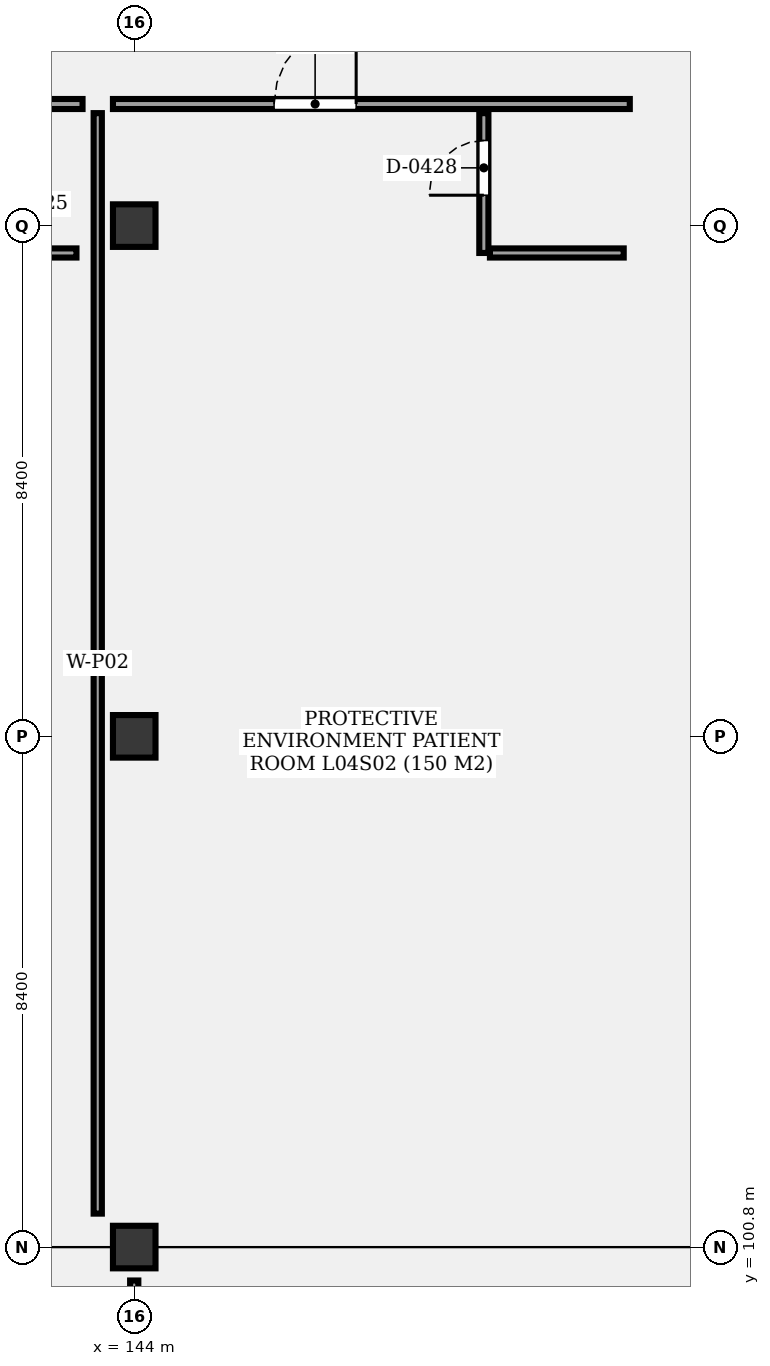
"""IFC4 building model, lengths in metres.
Left out: names, types, materials, properties, quantities, classifications, styles, units other than length and angle.
Written with IfcOpenShell. Run it as: python <this file> out.ifc"""

import sys

from ifc_helpers import new_model, si_unit, direction, frame, frame_2d, origin, origin_2d, place, context, subcontext, project, spatial, rectangle, extrude, element, fill, save


model = new_model("IFC4")
c1 = context("Model", 3, precision=1e-05, world=origin(), true_north=direction((0.0, 1.0)))
c2 = subcontext(c1, "Body", "Model", "MODEL_VIEW")
j1 = project(units=[si_unit("LENGTHUNIT", "METRE"), si_unit("PLANEANGLEUNIT", "RADIAN")], contexts=[c1])
p1 = place(None, origin())
s1 = spatial("IfcSite", under=j1, at=p1, CompositionType="ELEMENT")
p2 = place(p1, origin())
s2 = spatial("IfcBuilding", under=s1, at=p2, CompositionType="ELEMENT")
p3 = place(p2, frame((0.0, 0.0, 17.8)))
s3 = spatial("IfcBuildingStorey", under=s2, at=p3, CompositionType="ELEMENT", Elevation=17.8)
for number, where, z_axis, x_axis in (
    (1, (144.0, 100.8, 0.0), (0.0, 0.0, 1.0), (1.0, 0.0, 0.0)),
    (2, (144.0, 109.2, 0.0), (0.0, 0.0, 1.0), (1.0, 0.0, 0.0)),
    (3, (144.0, 117.6, 0.0), (0.0, 0.0, 1.0), (1.0, 0.0, 0.0)),
):
    element("IfcColumn", number, at=place(p3, frame(where, z_axis=z_axis, x_axis=x_axis)), inside=s3, PredefinedType="COLUMN", context=c2, shape_type="SweptSolid", body=[
        extrude(rectangle(XDim=0.7, YDim=0.7, at=origin_2d()), origin(), (0.0, 0.0, 1.0), 4.2),
    ])
p4 = place(p3, frame((134.65, 119.6, 0.0), z_axis=(0.0, 0.0, 1.0), x_axis=(1.0, 0.0, 0.0)))
e4 = element("IfcWall", 4, at=p4, inside=s3, PredefinedType="PARTITIONING", context=c2, shape_type="SweptSolid", body=[
    extrude(rectangle(XDim=8.5, YDim=0.165, at=frame_2d((4.25, 0.0))), origin(), (0.0, 0.0, 1.0), 3.3),
])
p5 = place(p4, frame((2.65, 0.0, 0.0)))
e5 = element("IfcOpeningElement", 5, at=p5, cuts=e4, PredefinedType="OPENING", context=c2, shape_type="SweptSolid", body=[
    extrude(rectangle(XDim=1.25, YDim=2.2, at=frame_2d((0.625, 1.1))), frame((0.0, 0.093, 0.0), z_axis=(0.0, -1.0, 0.0), x_axis=(1.0, 0.0, 0.0)), (0.0, 0.0, 1.0), 0.185),
])
p6 = place(p3, frame((140.85, 117.15, 0.0), z_axis=(0.0, 0.0, 1.0), x_axis=(1.0, 0.0, 0.0)))
e6 = element("IfcWall", 6, at=p6, inside=s3, PredefinedType="PARTITIONING", context=c2, shape_type="SweptSolid", body=[
    extrude(rectangle(XDim=2.2, YDim=0.15, at=frame_2d((1.1, 0.0))), origin(), (0.0, 0.0, 1.0), 3.3),
])
p7 = place(p3, frame((143.65, 119.6, 0.0), z_axis=(0.0, 0.0, 1.0), x_axis=(1.0, 0.0, 0.0)))
e7 = element("IfcWall", 7, at=p7, inside=s3, PredefinedType="PARTITIONING", context=c2, shape_type="SweptSolid", body=[
    extrude(rectangle(XDim=8.5, YDim=0.165, at=frame_2d((4.25, 0.0))), origin(), (0.0, 0.0, 1.0), 3.3),
])
p8 = place(p7, frame((2.65, 0.0, 0.0)))
e8 = element("IfcOpeningElement", 8, at=p8, cuts=e7, PredefinedType="OPENING", context=c2, shape_type="SweptSolid", body=[
    extrude(rectangle(XDim=1.35, YDim=2.4, at=frame_2d((0.675, 1.2))), frame((0.0, 0.093, 0.0), z_axis=(0.0, -1.0, 0.0), x_axis=(1.0, 0.0, 0.0)), (0.0, 0.0, 1.0), 0.185),
])
p9 = place(p3, frame((149.75, 117.15, 0.0), z_axis=(0.0, 0.0, 1.0), x_axis=(0.0, 1.0, 0.0)))
e9 = element("IfcWall", 9, at=p9, inside=s3, PredefinedType="PARTITIONING", context=c2, shape_type="SweptSolid", body=[
    extrude(rectangle(XDim=2.3, YDim=0.15, at=frame_2d((1.15, 0.0))), origin(), (0.0, 0.0, 1.0), 3.3),
])
p10 = place(p9, frame((0.95, 0.0, 0.0)))
e10 = element("IfcOpeningElement", 10, at=p10, cuts=e9, PredefinedType="OPENING", context=c2, shape_type="SweptSolid", body=[
    extrude(rectangle(XDim=0.9, YDim=2.1, at=frame_2d((0.45, 1.05))), frame((0.0, 0.085, 0.0), z_axis=(0.0, -1.0, 0.0), x_axis=(1.0, 0.0, 0.0)), (0.0, 0.0, 1.0), 0.17),
])
p11 = place(p3, frame((149.85, 117.15, 0.0), z_axis=(0.0, 0.0, 1.0), x_axis=(1.0, 0.0, 0.0)))
e11 = element("IfcWall", 11, at=p11, inside=s3, PredefinedType="PARTITIONING", context=c2, shape_type="SweptSolid", body=[
    extrude(rectangle(XDim=2.2, YDim=0.15, at=frame_2d((1.1, 0.0))), origin(), (0.0, 0.0, 1.0), 3.3),
])
p12 = place(p3, frame((143.4, 101.35, 0.0), z_axis=(0.0, 0.0, 1.0), x_axis=(0.0, 1.0, 0.0)))
e12 = element("IfcWall", 12, at=p12, inside=s3, PredefinedType="PARTITIONING", context=c2, shape_type="SweptSolid", body=[
    extrude(rectangle(XDim=18.1, YDim=0.135, at=frame_2d((9.05, 0.0))), origin(), (0.0, 0.0, 1.0), 3.3),
])
p13 = place(p3, frame((144.0, 90.55, 0.0), z_axis=(0.0, 0.0, 1.0), x_axis=(0.0, 1.0, 0.0)))
e13 = element("IfcWall", 13, at=p13, inside=s3, PredefinedType="PARTITIONING", context=c2, shape_type="SweptSolid", body=[
    extrude(rectangle(XDim=9.7, YDim=0.135, at=frame_2d((4.85, 0.0))), origin(), (0.0, 0.0, 1.0), 3.3),
])
p14 = place(p8, origin())
e14 = element("IfcDoor", 14, at=p14, inside=s3, OperationType="SINGLE_SWING_RIGHT", PredefinedType="DOOR", context=c2, shape_type="SweptSolid", body=[
    extrude(rectangle(XDim=1.35, YDim=2.4, at=frame_2d((0.675, 1.2))), frame((0.0, 0.025, 0.0), z_axis=(0.0, -1.0, 0.0), x_axis=(1.0, 0.0, 0.0)), (0.0, 0.0, 1.0), 0.05),
])
fill(e8, e14)
p15 = place(p10, origin())
e15 = element("IfcDoor", 15, at=p15, inside=s3, OperationType="SINGLE_SWING_LEFT", PredefinedType="DOOR", context=c2, shape_type="SweptSolid", body=[
    extrude(rectangle(XDim=0.9, YDim=2.1, at=frame_2d((0.45, 1.05))), frame((0.0, 0.025, 0.0), z_axis=(0.0, -1.0, 0.0), x_axis=(1.0, 0.0, 0.0)), (0.0, 0.0, 1.0), 0.05),
])
fill(e10, e15)
save(model, sys.argv[1])
